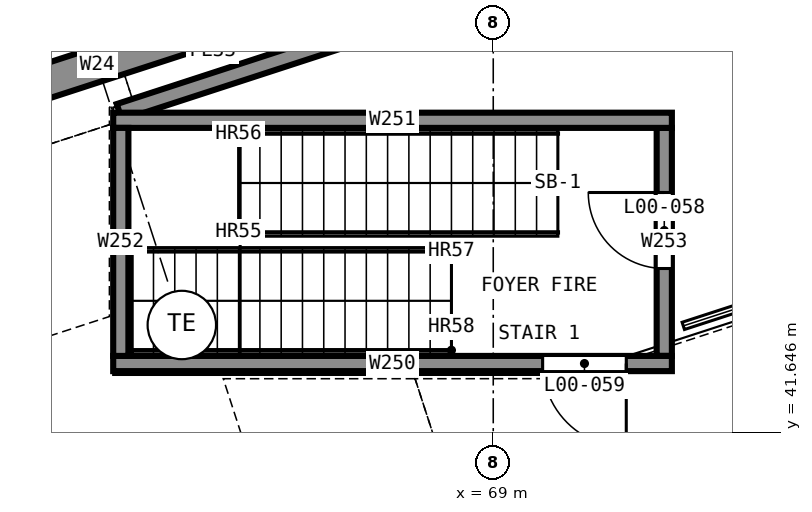
"""IFC4 building model, lengths in metres.
Left out: names, types, materials, properties, quantities, classifications, styles, units other than length and angle.
Written with IfcOpenShell. Run it as: python <this file> out.ifc"""

import sys

from ifc_helpers import new_model, si_unit, direction, frame, frame_2d, origin, place, context, subcontext, project, spatial, rectangle, extrude, element, fill, save


model = new_model("IFC4")
c1 = context("Model", 3, precision=1e-05, world=origin(), true_north=direction((0.0, 1.0)))
c2 = subcontext(c1, "Body", "Model", "MODEL_VIEW")
j1 = project(units=[si_unit("LENGTHUNIT", "METRE"), si_unit("PLANEANGLEUNIT", "RADIAN")], contexts=[c1])
p1 = place(None, origin())
s1 = spatial("IfcSite", under=j1, at=p1, CompositionType="ELEMENT")
p2 = place(p1, origin())
s2 = spatial("IfcBuilding", under=s1, at=p2, CompositionType="ELEMENT")
p3 = place(p2, origin())
s3 = spatial("IfcBuildingStorey", under=s2, at=p3, CompositionType="ELEMENT", Elevation=0.0)
p4 = place(p3, frame((49.786, 41.93, 0.0), z_axis=(0.0, 0.0, 1.0), x_axis=(0.951055937194, 0.309018776661, 0.0)))
e1 = element("IfcWall", 1, at=p4, inside=s3, PredefinedType="SHEAR", context=c2, shape_type="SweptSolid", body=[
    extrude(rectangle(XDim=29.45, YDim=0.45, at=frame_2d((14.725, 0.0))), origin(), (0.0, 0.0, 1.0), 5.5),
])
p5 = place(p3, frame((64.0, 42.55, 0.0), z_axis=(0.0, 0.0, 1.0), x_axis=(1.0, 0.0, 0.0)))
e2 = element("IfcWall", 2, at=p5, inside=s3, PredefinedType="SHEAR", context=c2, shape_type="SweptSolid", body=[
    extrude(rectangle(XDim=7.35, YDim=0.2, at=frame_2d((3.675, 0.0))), origin(), (0.0, 0.0, 1.0), 5.5),
])
p6 = place(p5, frame((5.65, 0.0, 0.0)))
e3 = element("IfcOpeningElement", 3, at=p6, cuts=e2, PredefinedType="OPENING", context=c2, shape_type="SweptSolid", body=[
    extrude(rectangle(XDim=1.1, YDim=2.1, at=frame_2d((0.55, 1.05))), frame((0.0, 0.11, 0.0), z_axis=(0.0, -1.0, 0.0), x_axis=(1.0, 0.0, 0.0)), (0.0, 0.0, 1.0), 0.22),
])
p7 = place(p3, frame((71.35, 45.75, 0.0), z_axis=(0.0, 0.0, 1.0), x_axis=(-1.0, 0.0, 0.0)))
e4 = element("IfcWall", 4, at=p7, inside=s3, PredefinedType="SHEAR", context=c2, shape_type="SweptSolid", body=[
    extrude(rectangle(XDim=7.35, YDim=0.2, at=frame_2d((3.675, 0.0))), origin(), (0.0, 0.0, 1.0), 5.5),
])
p8 = place(p3, frame((64.1, 45.65, 0.0), z_axis=(0.0, 0.0, 1.0), x_axis=(0.0, -1.0, 0.0)))
e5 = element("IfcWall", 5, at=p8, inside=s3, PredefinedType="SHEAR", context=c2, shape_type="SweptSolid", body=[
    extrude(rectangle(XDim=3.0, YDim=0.2, at=frame_2d((1.5, 0.0))), origin(), (0.0, 0.0, 1.0), 5.5),
])
p9 = place(p3, frame((71.25, 42.65, 0.0), z_axis=(0.0, 0.0, 1.0), x_axis=(0.0, 1.0, 0.0)))
e6 = element("IfcWall", 6, at=p9, inside=s3, PredefinedType="SHEAR", context=c2, shape_type="SweptSolid", body=[
    extrude(rectangle(XDim=3.0, YDim=0.2, at=frame_2d((1.5, 0.0))), origin(), (0.0, 0.0, 1.0), 5.5),
])
p10 = place(p9, frame((1.15, 0.0, 0.0)))
e7 = element("IfcOpeningElement", 7, at=p10, cuts=e6, PredefinedType="OPENING", context=c2, shape_type="SweptSolid", body=[
    extrude(rectangle(XDim=1.0, YDim=2.1, at=frame_2d((0.5, 1.05))), frame((0.0, 0.11, 0.0), z_axis=(0.0, -1.0, 0.0), x_axis=(1.0, 0.0, 0.0)), (0.0, 0.0, 1.0), 0.22),
])
p11 = place(p3, frame((64.081, 45.859, 0.0), z_axis=(0.0, 0.0, 1.0), x_axis=(0.950848496094, 0.309656483019, 0.0)))
e8 = element("IfcWall", 8, at=p11, inside=s3, PredefinedType="SOLIDWALL", context=c2, shape_type="SweptSolid", body=[
    extrude(rectangle(XDim=15.086, YDim=0.22, at=frame_2d((7.543, 0.0))), origin(), (0.0, 0.0, 1.0), 5.2),
])
p12 = place(p10, origin())
e9 = element("IfcDoor", 9, at=p12, inside=s3, OperationType="SINGLE_SWING_LEFT", PredefinedType="DOOR", context=c2, shape_type="SweptSolid", body=[
    extrude(rectangle(XDim=1.0, YDim=2.1, at=frame_2d((0.5, 1.05))), frame((0.0, 0.025, 0.0), z_axis=(0.0, -1.0, 0.0), x_axis=(1.0, 0.0, 0.0)), (0.0, 0.0, 1.0), 0.05),
])
fill(e7, e9)
p13 = place(p6, frame((1.1, 0.0, 0.0), z_axis=(0.0, 0.0, 1.0), x_axis=(-1.0, 0.0, 0.0)))
e10 = element("IfcDoor", 10, at=p13, inside=s3, OperationType="SINGLE_SWING_RIGHT", PredefinedType="DOOR", context=c2, shape_type="SweptSolid", body=[
    extrude(rectangle(XDim=1.1, YDim=2.1, at=frame_2d((0.55, 1.05))), frame((0.0, 0.025, 0.0), z_axis=(0.0, -1.0, 0.0), x_axis=(1.0, 0.0, 0.0)), (0.0, 0.0, 1.0), 0.05),
])
fill(e3, e10)
save(model, sys.argv[1])
